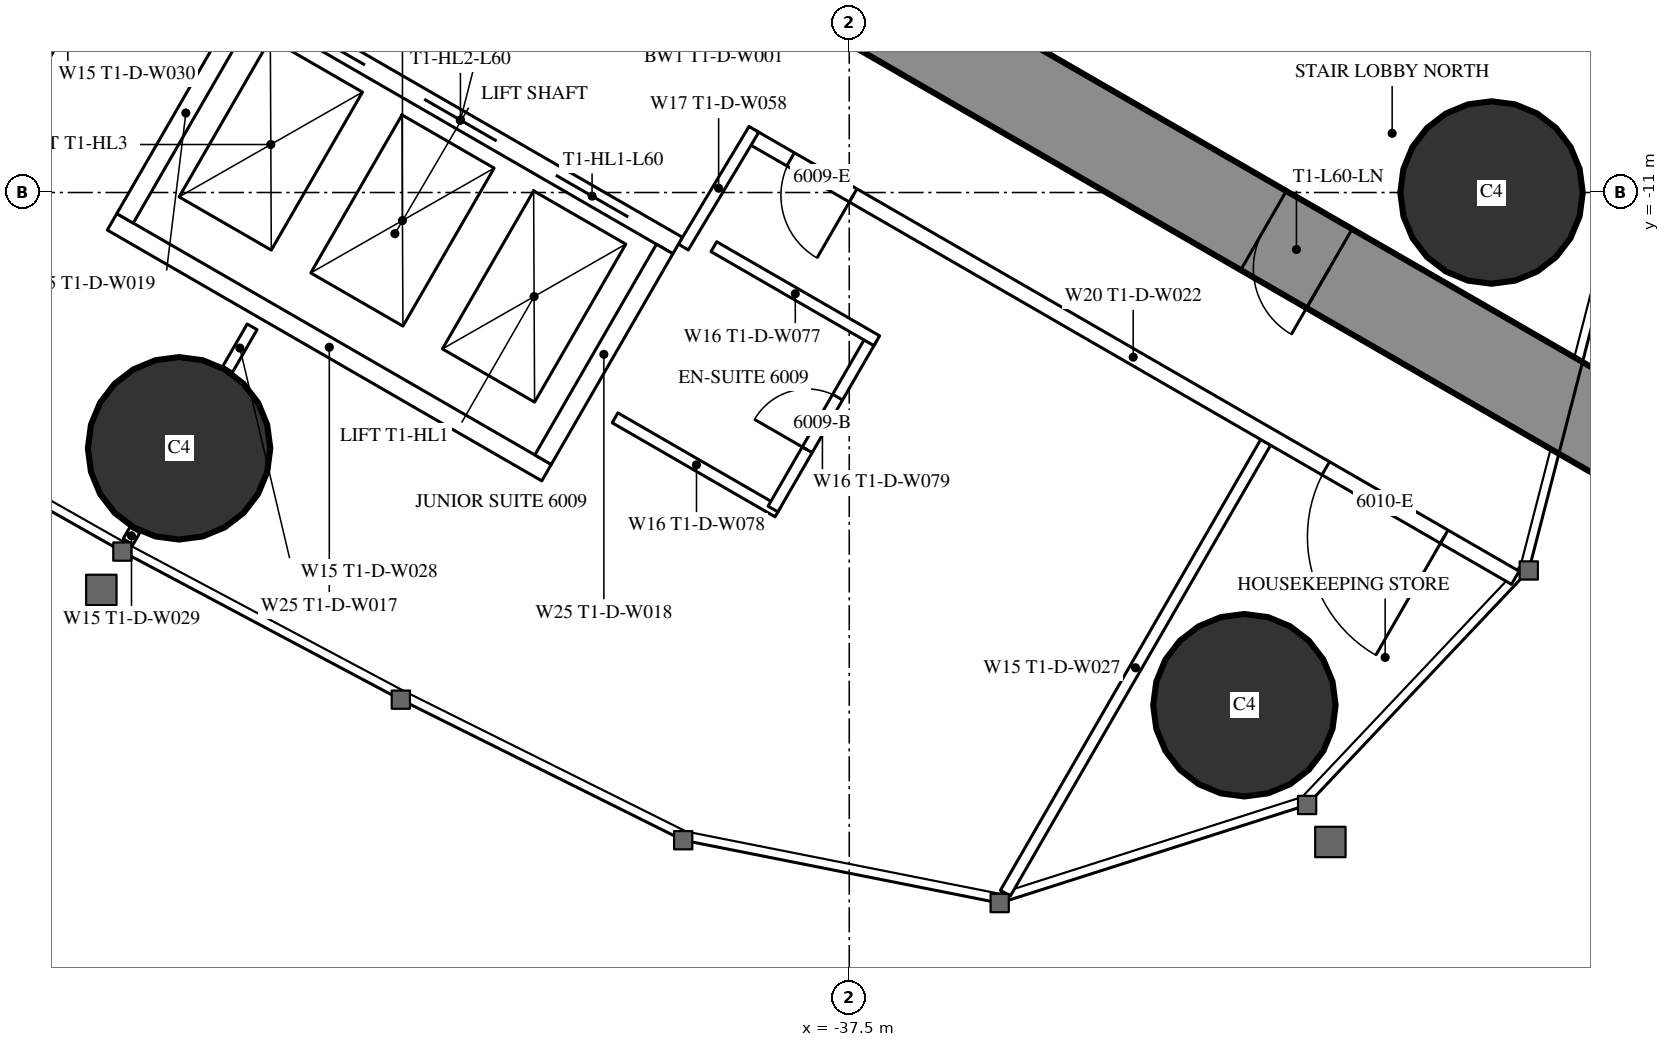
"""IFC4 building model, lengths in metres.
Left out: names, types, materials, properties, quantities, classifications, styles, units other than length and angle.
Written with IfcOpenShell. Run it as: python <this file> out.ifc"""

import sys

from ifc_helpers import new_model, si_unit, direction, frame, frame_2d, origin, origin_2d, place, context, subcontext, project, spatial, rectangle, circle, extrude, element, fill, save


model = new_model("IFC4")
c1 = context("Model", 3, precision=1e-05, world=origin(), true_north=direction((0.0, 1.0)))
c2 = subcontext(c1, "Body", "Model", "MODEL_VIEW")
j1 = project(units=[si_unit("LENGTHUNIT", "METRE"), si_unit("PLANEANGLEUNIT", "RADIAN")], contexts=[c1])
p1 = place(None, origin())
s1 = spatial("IfcSite", under=j1, at=p1, CompositionType="ELEMENT")
p2 = place(p1, origin())
s2 = spatial("IfcBuilding", under=s1, at=p2, CompositionType="ELEMENT")
p3 = place(p2, frame((0.0, 0.0, 226.1)))
s3 = spatial("IfcBuildingStorey", under=s2, at=p3, CompositionType="ELEMENT", Elevation=226.1)
for number, where, z_axis, x_axis in (
    (1, (-32.301, -17.745, 0.0), (0.0, 0.0, 1.0), (1.0, 0.0, 0.0)),
    (2, (-29.05, -11.0, 0.0), (0.0, 0.0, 1.0), (1.0, 0.0, 0.0)),
    (3, (-46.317, -14.365, 0.0), (0.0, 0.0, 1.0), (1.0, 0.0, 0.0)),
):
    element("IfcColumn", number, at=place(p3, frame(where, z_axis=z_axis, x_axis=x_axis)), inside=s3, PredefinedType="COLUMN", context=c2, shape_type="SweptSolid", body=[
        extrude(circle(Radius=1.2, at=origin_2d()), origin(), (0.0, 0.0, 1.0), 3.6),
    ])
p4 = place(p3, frame((-27.2, -14.3, 0.0), z_axis=(0.0, 0.0, 1.0), x_axis=(-0.866024021859, 0.500002393557, 0.0)))
e4 = element("IfcWall", 4, at=p4, inside=s3, PredefinedType="SHEAR", context=c2, shape_type="SweptSolid", body=[
    extrude(rectangle(XDim=27.907, YDim=1.2, at=frame_2d((13.954, 0.0))), origin(), (0.0, 0.0, 1.0), 3.6),
])
p5 = place(p4, frame((4.6, 0.0, 0.0)))
e5 = element("IfcOpeningElement", 5, at=p5, cuts=e4, PredefinedType="OPENING", context=c2, shape_type="SweptSolid", body=[
    extrude(rectangle(XDim=1.0, YDim=2.2, at=frame_2d((0.5, 1.1))), frame((0.0, 0.61, 0.0), z_axis=(0.0, -1.0, 0.0), x_axis=(1.0, 0.0, 0.0)), (0.0, 0.0, 1.0), 1.22),
])
p6 = place(p4, frame((13.395, 0.0, 0.0)))
e6 = element("IfcOpeningElement", 6, at=p6, cuts=e4, PredefinedType="OPENING", context=c2, shape_type="SweptSolid", body=[
    extrude(rectangle(XDim=1.8, YDim=2.2, at=frame_2d((0.9, 1.1))), frame((0.0, 0.61, 0.0), z_axis=(0.0, -1.0, 0.0), x_axis=(1.0, 0.0, 0.0)), (0.0, 0.0, 1.0), 1.22),
])
p7 = place(p3, frame((-32.022, -14.287, 0.0), z_axis=(0.0, 0.0, 1.0), x_axis=(-0.50000019414, -0.866025291697, 0.0)))
e7 = element("IfcWall", 7, at=p7, inside=s3, PredefinedType="PARTITIONING", context=c2, shape_type="SweptSolid", body=[
    extrude(rectangle(XDim=6.848, YDim=0.15, at=frame_2d((3.424, 0.0))), origin(), (0.0, 0.0, 1.0), 3.35),
])
p8 = place(p3, frame((-46.898, -15.439, 0.0), z_axis=(0.0, 0.0, 1.0), x_axis=(-0.500232303069, -0.865891241997, 0.0)))
e8 = element("IfcWall", 8, at=p8, inside=s3, PredefinedType="PARTITIONING", context=c2, shape_type="SweptSolid", body=[
    extrude(rectangle(XDim=0.18, YDim=0.15, at=frame_2d((0.09, 0.0))), origin(), (0.0, 0.0, 1.0), 2.45),
])
p9 = place(p3, frame((-46.274, -6.059, 0.0), z_axis=(0.0, 0.0, 1.0), x_axis=(-0.500020471368, -0.866013584312, 0.0)))
e9 = element("IfcWall", 9, at=p9, inside=s3, PredefinedType="PARTITIONING", context=c2, shape_type="SweptSolid", body=[
    extrude(rectangle(XDim=6.028, YDim=0.15, at=frame_2d((3.014, 0.0))), origin(), (0.0, 0.0, 1.0), 2.45),
])
p10 = place(p3, frame((-45.356, -12.767, 0.0), z_axis=(0.0, 0.0, 1.0), x_axis=(-0.499886366516, -0.866091000168, 0.0)))
e10 = element("IfcWall", 10, at=p10, inside=s3, PredefinedType="PARTITIONING", context=c2, shape_type="SweptSolid", body=[
    extrude(rectangle(XDim=0.645, YDim=0.15, at=frame_2d((0.322, 0.0))), origin(), (0.0, 0.0, 1.0), 3.35),
])
p11 = place(p3, frame((-28.737, -16.068, 0.0), z_axis=(0.0, 0.0, 1.0), x_axis=(-0.866029399323, 0.49999307946, 0.0)))
e11 = element("IfcWall", 11, at=p11, inside=s3, PredefinedType="PARTITIONING", context=c2, shape_type="SweptSolid", body=[
    extrude(rectangle(XDim=11.61, YDim=0.2, at=frame_2d((5.805, 0.0))), origin(), (0.0, 0.0, 1.0), 3.35),
])
p12 = place(p11, frame((1.08, 0.0, 0.0)))
e12 = element("IfcOpeningElement", 12, at=p12, cuts=e11, PredefinedType="OPENING", context=c2, shape_type="SweptSolid", body=[
    extrude(rectangle(XDim=1.8, YDim=2.04, at=frame_2d((0.9, 1.02))), frame((0.0, 0.11, 0.0), z_axis=(0.0, -1.0, 0.0), x_axis=(1.0, 0.0, 0.0)), (0.0, 0.0, 1.0), 0.22),
])
p13 = place(p11, frame((10.06, 0.0, 0.0)))
e13 = element("IfcOpeningElement", 13, at=p13, cuts=e11, PredefinedType="OPENING", context=c2, shape_type="SweptSolid", body=[
    extrude(rectangle(XDim=0.95, YDim=2.2, at=frame_2d((0.475, 1.1))), frame((0.0, 0.11, 0.0), z_axis=(0.0, -1.0, 0.0), x_axis=(1.0, 0.0, 0.0)), (0.0, 0.0, 1.0), 0.22),
])
p14 = place(p3, frame((-39.683, -11.718, 0.0), z_axis=(0.0, 0.0, 1.0), x_axis=(0.514336634837, 0.857588377991, 0.0)))
e14 = element("IfcWall", 14, at=p14, inside=s3, PredefinedType="PARTITIONING", context=c2, shape_type="SweptSolid", body=[
    extrude(rectangle(XDim=1.805, YDim=0.15, at=frame_2d((0.903, 0.0))), origin(), (0.0, 0.0, 1.0), 3.35),
])
p15 = place(p3, frame((-38.438, -15.202, 0.0), z_axis=(0.0, 0.0, 1.0), x_axis=(-0.866073894602, 0.499916002032, 0.0)))
e15 = element("IfcWall", 15, at=p15, inside=s3, PredefinedType="PARTITIONING", context=c2, shape_type="SweptSolid", body=[
    extrude(rectangle(XDim=2.475, YDim=0.15, at=frame_2d((1.238, 0.0))), origin(), (0.0, 0.0, 1.0), 3.35),
])
p16 = place(p3, frame((-37.203, -12.913, 0.0), z_axis=(0.0, 0.0, 1.0), x_axis=(-0.500006934395, -0.866021400173, 0.0)))
e16 = element("IfcWall", 16, at=p16, inside=s3, PredefinedType="PARTITIONING", context=c2, shape_type="SweptSolid", body=[
    extrude(rectangle(XDim=2.6, YDim=0.15, at=frame_2d((1.3, 0.0))), origin(), (0.0, 0.0, 1.0), 3.35),
])
p17 = place(p16, frame((0.9, 0.0, 0.0)))
e17 = element("IfcOpeningElement", 17, at=p17, cuts=e16, PredefinedType="OPENING", context=c2, shape_type="SweptSolid", body=[
    extrude(rectangle(XDim=0.8, YDim=2.2, at=frame_2d((0.4, 1.1))), frame((0.0, 0.085, 0.0), z_axis=(0.0, -1.0, 0.0), x_axis=(1.0, 0.0, 0.0)), (0.0, 0.0, 1.0), 0.17),
])
p18 = place(p3, frame((-37.138, -12.95, 0.0), z_axis=(0.0, 0.0, 1.0), x_axis=(-0.866031185235, 0.4999899861, 0.0)))
e18 = element("IfcWall", 18, at=p18, inside=s3, PredefinedType="PARTITIONING", context=c2, shape_type="SweptSolid", body=[
    extrude(rectangle(XDim=2.475, YDim=0.15, at=frame_2d((1.238, 0.0))), origin(), (0.0, 0.0, 1.0), 2.5),
])
p19 = place(p3, frame((-39.758, -11.697, 0.0), z_axis=(0.0, 0.0, 1.0), x_axis=(-0.866024194504, 0.500002094529, 0.0)))
e19 = element("IfcWall", 19, at=p19, inside=s3, PredefinedType="PARTITIONING", context=c2, shape_type="SweptSolid", body=[
    extrude(rectangle(XDim=6.6, YDim=0.25, at=frame_2d((3.3, 0.0))), origin(), (0.0, 0.0, 1.0), 3.35),
])
p20 = place(p19, frame((0.75, 0.0, 0.0)))
e20 = element("IfcOpeningElement", 20, at=p20, cuts=e19, PredefinedType="OPENING", context=c2, shape_type="SweptSolid", body=[
    extrude(rectangle(XDim=1.1, YDim=2.2, at=frame_2d((0.55, 1.1))), frame((0.0, 0.135, 0.0), z_axis=(0.0, -1.0, 0.0), x_axis=(1.0, 0.0, 0.0)), (0.0, 0.0, 1.0), 0.27),
])
p21 = place(p19, frame((2.75, 0.0, 0.0)))
e21 = element("IfcOpeningElement", 21, at=p21, cuts=e19, PredefinedType="OPENING", context=c2, shape_type="SweptSolid", body=[
    extrude(rectangle(XDim=1.1, YDim=2.2, at=frame_2d((0.55, 1.1))), frame((0.0, 0.135, 0.0), z_axis=(0.0, -1.0, 0.0), x_axis=(1.0, 0.0, 0.0)), (0.0, 0.0, 1.0), 0.27),
])
p22 = place(p19, frame((4.75, 0.0, 0.0)))
e22 = element("IfcOpeningElement", 22, at=p22, cuts=e19, PredefinedType="OPENING", context=c2, shape_type="SweptSolid", body=[
    extrude(rectangle(XDim=1.1, YDim=2.2, at=frame_2d((0.55, 1.1))), frame((0.0, 0.135, 0.0), z_axis=(0.0, -1.0, 0.0), x_axis=(1.0, 0.0, 0.0)), (0.0, 0.0, 1.0), 0.27),
])
p23 = place(p3, frame((-41.482, -14.686, 0.0), z_axis=(0.0, 0.0, 1.0), x_axis=(-0.86603344179, 0.499986077507, 0.0)))
e23 = element("IfcWall", 23, at=p23, inside=s3, PredefinedType="PARTITIONING", context=c2, shape_type="SweptSolid", body=[
    extrude(rectangle(XDim=6.6, YDim=0.25, at=frame_2d((3.3, 0.0))), origin(), (0.0, 0.0, 1.0), 3.35),
])
for number, where, z_axis, x_axis in (
    (24, (-39.928, -11.743, 0.0), (0.0, 0.0, 1.0), (-0.5, -0.866, 0.0)),
    (25, (-45.428, -8.568, 0.0), (0.0, 0.0, 1.0), (-0.5, -0.866, 0.0)),
):
    element("IfcWall", number, at=place(p3, frame(where, z_axis=z_axis, x_axis=x_axis)), inside=s3, PredefinedType="PARTITIONING", context=c2, shape_type="SweptSolid", body=[
        extrude(rectangle(XDim=3.201, YDim=0.25, at=frame_2d((1.6, 0.0))), origin(), (0.0, 0.0, 1.0), 3.35),
    ])
p24 = place(p12, origin())
e26 = element("IfcDoor", 26, at=p24, inside=s3, OperationType="DOUBLE_DOOR_SINGLE_SWING", PredefinedType="DOOR", context=c2, shape_type="SweptSolid", body=[
    extrude(rectangle(XDim=1.8, YDim=2.04, at=frame_2d((0.9, 1.02))), frame((0.0, 0.025, 0.0), z_axis=(0.0, -1.0, 0.0), x_axis=(1.0, 0.0, 0.0)), (0.0, 0.0, 1.0), 0.05),
])
fill(e12, e26)
p25 = place(p17, origin())
e27 = element("IfcDoor", 27, at=p25, inside=s3, OperationType="SINGLE_SWING_RIGHT", PredefinedType="DOOR", context=c2, shape_type="SweptSolid", body=[
    extrude(rectangle(XDim=0.8, YDim=2.2, at=frame_2d((0.4, 1.1))), frame((0.0, 0.025, 0.0), z_axis=(0.0, -1.0, 0.0), x_axis=(1.0, 0.0, 0.0)), (0.0, 0.0, 1.0), 0.05),
])
fill(e17, e27)
p26 = place(p13, origin())
e28 = element("IfcDoor", 28, at=p26, inside=s3, OperationType="SINGLE_SWING_LEFT", PredefinedType="DOOR", context=c2, shape_type="SweptSolid", body=[
    extrude(rectangle(XDim=0.95, YDim=2.2, at=frame_2d((0.475, 1.1))), frame((0.0, 0.025, 0.0), z_axis=(0.0, -1.0, 0.0), x_axis=(1.0, 0.0, 0.0)), (0.0, 0.0, 1.0), 0.05),
])
fill(e13, e28)
p27 = place(p5, origin())
e29 = element("IfcDoor", 29, at=p27, inside=s3, OperationType="SINGLE_SWING_LEFT", PredefinedType="DOOR", context=c2, shape_type="SweptSolid", body=[
    extrude(rectangle(XDim=1.0, YDim=2.2, at=frame_2d((0.5, 1.1))), frame((0.0, 0.025, 0.0), z_axis=(0.0, -1.0, 0.0), x_axis=(1.0, 0.0, 0.0)), (0.0, 0.0, 1.0), 0.05),
])
fill(e5, e29)
p28 = place(p20, origin())
e30 = element("IfcDoor", 30, at=p28, inside=s3, OperationType="DOUBLE_DOOR_SLIDING", PredefinedType="USERDEFINED", context=c2, shape_type="SweptSolid", body=[
    extrude(rectangle(XDim=1.1, YDim=2.2, at=frame_2d((0.55, 1.1))), frame((0.0, 0.025, 0.0), z_axis=(0.0, -1.0, 0.0), x_axis=(1.0, 0.0, 0.0)), (0.0, 0.0, 1.0), 0.05),
])
fill(e20, e30)
p29 = place(p21, origin())
e31 = element("IfcDoor", 31, at=p29, inside=s3, OperationType="DOUBLE_DOOR_SLIDING", PredefinedType="USERDEFINED", context=c2, shape_type="SweptSolid", body=[
    extrude(rectangle(XDim=1.1, YDim=2.2, at=frame_2d((0.55, 1.1))), frame((0.0, 0.025, 0.0), z_axis=(0.0, -1.0, 0.0), x_axis=(1.0, 0.0, 0.0)), (0.0, 0.0, 1.0), 0.05),
])
fill(e21, e31)
p30 = place(p22, origin())
e32 = element("IfcDoor", 32, at=p30, inside=s3, OperationType="DOUBLE_DOOR_SLIDING", PredefinedType="USERDEFINED", context=c2, shape_type="SweptSolid", body=[
    extrude(rectangle(XDim=1.1, YDim=2.2, at=frame_2d((0.55, 1.1))), frame((0.0, 0.025, 0.0), z_axis=(0.0, -1.0, 0.0), x_axis=(1.0, 0.0, 0.0)), (0.0, 0.0, 1.0), 0.05),
])
fill(e22, e32)
save(model, sys.argv[1])
